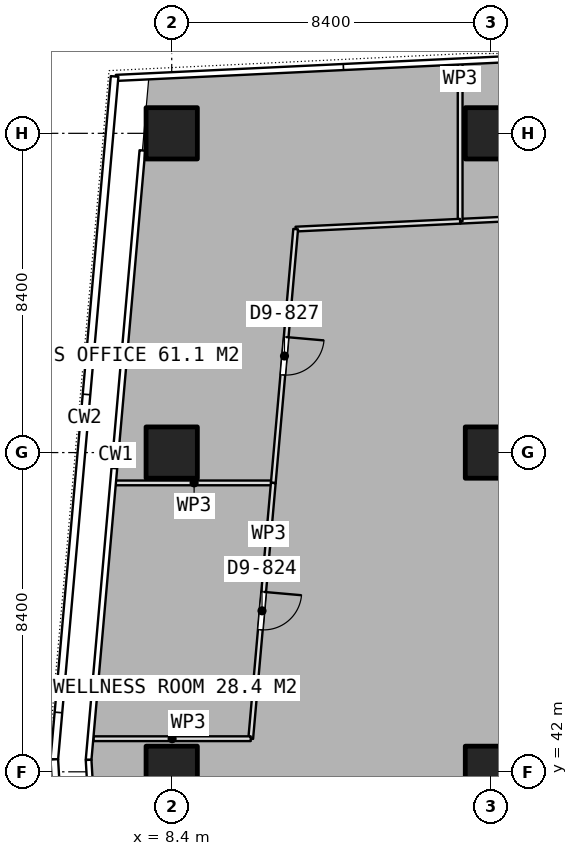
"""IFC4 building model, lengths in metres.
Left out: names, types, materials, properties, quantities, classifications, styles, units other than length and angle.
Written with IfcOpenShell. Run it as: python <this file> out.ifc"""

import sys

from ifc_helpers import new_model, si_unit, direction, frame, frame_2d, origin, origin_2d, place, context, subcontext, project, spatial, rectangle, extrude, element, fill, save


model = new_model("IFC4")
c1 = context("Model", 3, precision=1e-05, world=origin(), true_north=direction((0.0, 1.0)))
c2 = subcontext(c1, "Body", "Model", "MODEL_VIEW")
j1 = project(units=[si_unit("LENGTHUNIT", "METRE"), si_unit("PLANEANGLEUNIT", "RADIAN")], contexts=[c1])
p1 = place(None, origin())
s1 = spatial("IfcSite", under=j1, at=p1, CompositionType="ELEMENT")
p2 = place(p1, origin())
s2 = spatial("IfcBuilding", under=s1, at=p2, CompositionType="ELEMENT")
p3 = place(p2, frame((0.0, 0.0, 202.7)))
s3 = spatial("IfcBuildingStorey", under=s2, at=p3, CompositionType="ELEMENT", Elevation=202.7)
for number, where, z_axis, x_axis in (
    (1, (8.4, 42.0, 0.0), (0.0, 0.0, 1.0), (1.0, 0.0, 0.0)),
    (2, (8.4, 50.4, 0.0), (0.0, 0.0, 1.0), (1.0, 0.0, 0.0)),
    (3, (8.4, 58.8, 0.0), (0.0, 0.0, 1.0), (1.0, 0.0, 0.0)),
    (4, (16.8, 42.0, 0.0), (0.0, 0.0, 1.0), (1.0, 0.0, 0.0)),
    (5, (16.8, 50.4, 0.0), (0.0, 0.0, 1.0), (1.0, 0.0, 0.0)),
    (6, (16.8, 58.8, 0.0), (0.0, 0.0, 1.0), (1.0, 0.0, 0.0)),
):
    element("IfcColumn", number, at=place(p3, frame(where, z_axis=z_axis, x_axis=x_axis)), inside=s3, PredefinedType="COLUMN", context=c2, shape_type="SweptSolid", body=[
        extrude(rectangle(XDim=1.35, YDim=1.35, at=origin_2d()), origin(), (0.0, 0.0, 1.0), 3.75),
    ])
p4 = place(p3, frame((24.317, 56.885, 0.0), z_axis=(0.0, 0.0, 1.0), x_axis=(-0.998859973319, -0.047736293327, 0.0)))
e7 = element("IfcWall", 7, at=p4, inside=s3, PredefinedType="PARTITIONING", context=c2, shape_type="SweptSolid", body=[
    extrude(rectangle(XDim=8.336, YDim=0.125, at=frame_2d((4.168, 0.0))), origin(), (0.0, 0.0, 1.0), 3.5),
])
p5 = place(p4, frame((3.668, 0.0, 0.0)))
e8 = element("IfcOpeningElement", 8, at=p5, cuts=e7, PredefinedType="OPENING", context=c2, shape_type="SweptSolid", body=[
    extrude(rectangle(XDim=1.0, YDim=2.1, at=frame_2d((0.5, 1.05))), frame((0.0, 0.073, 0.0), z_axis=(0.0, -1.0, 0.0), x_axis=(1.0, 0.0, 0.0)), (0.0, 0.0, 1.0), 0.145),
])
p6 = place(p3, frame((15.99, 56.487, 0.0), z_axis=(0.0, 0.0, 1.0), x_axis=(0.0, 1.0, 0.0)))
e9 = element("IfcWall", 9, at=p6, inside=s3, PredefinedType="PARTITIONING", context=c2, shape_type="SweptSolid", body=[
    extrude(rectangle(XDim=4.155, YDim=0.125, at=frame_2d((2.078, 0.0))), origin(), (0.0, 0.0, 1.0), 3.5),
])
p7 = place(p3, frame((11.073, 49.602, 0.0), z_axis=(0.0, 0.0, 1.0), x_axis=(-1.0, 0.0, 0.0)))
e10 = element("IfcWall", 10, at=p7, inside=s3, PredefinedType="PARTITIONING", context=c2, shape_type="SweptSolid", body=[
    extrude(rectangle(XDim=4.167, YDim=0.125, at=frame_2d((2.083, 0.0))), origin(), (0.0, 0.0, 1.0), 3.5),
])
p8 = place(p3, frame((15.989, 56.487, 0.0), z_axis=(0.0, 0.0, 1.0), x_axis=(-0.998857273451, -0.047792753365, 0.0)))
e11 = element("IfcWall", 11, at=p8, inside=s3, PredefinedType="PARTITIONING", context=c2, shape_type="SweptSolid", body=[
    extrude(rectangle(XDim=4.332, YDim=0.125, at=frame_2d((2.166, 0.0))), origin(), (0.0, 0.0, 1.0), 3.5),
])
p9 = place(p3, frame((11.662, 56.28, 0.0), z_axis=(0.0, 0.0, 1.0), x_axis=(-0.087875742136, -0.99613144411, 0.0)))
e12 = element("IfcWall", 12, at=p9, inside=s3, PredefinedType="PARTITIONING", context=c2, shape_type="SweptSolid", body=[
    extrude(rectangle(XDim=6.704, YDim=0.125, at=frame_2d((3.352, 0.0))), origin(), (0.0, 0.0, 1.0), 3.5),
])
p10 = place(p9, frame((2.852, 0.0, 0.0)))
e13 = element("IfcOpeningElement", 13, at=p10, cuts=e12, PredefinedType="OPENING", context=c2, shape_type="SweptSolid", body=[
    extrude(rectangle(XDim=1.0, YDim=2.1, at=frame_2d((0.5, 1.05))), frame((0.0, 0.073, 0.0), z_axis=(0.0, -1.0, 0.0), x_axis=(1.0, 0.0, 0.0)), (0.0, 0.0, 1.0), 0.145),
])
p11 = place(p3, frame((11.073, 49.601, 0.0), z_axis=(0.0, 0.0, 1.0), x_axis=(-0.087919121044, -0.9961276164, 0.0)))
e14 = element("IfcWall", 14, at=p11, inside=s3, PredefinedType="PARTITIONING", context=c2, shape_type="SweptSolid", body=[
    extrude(rectangle(XDim=6.756, YDim=0.125, at=frame_2d((3.378, 0.0))), origin(), (0.0, 0.0, 1.0), 3.5),
])
p12 = place(p11, frame((2.878, 0.0, 0.0)))
e15 = element("IfcOpeningElement", 15, at=p12, cuts=e14, PredefinedType="OPENING", context=c2, shape_type="SweptSolid", body=[
    extrude(rectangle(XDim=1.0, YDim=2.1, at=frame_2d((0.5, 1.05))), frame((0.0, 0.073, 0.0), z_axis=(0.0, -1.0, 0.0), x_axis=(1.0, 0.0, 0.0)), (0.0, 0.0, 1.0), 0.145),
])
p13 = place(p3, frame((10.479, 42.871, 0.0), z_axis=(0.0, 0.0, 1.0), x_axis=(-1.0, 0.0, 0.0)))
e16 = element("IfcWall", 16, at=p13, inside=s3, PredefinedType="PARTITIONING", context=c2, shape_type="SweptSolid", body=[
    extrude(rectangle(XDim=4.137, YDim=0.125, at=frame_2d((2.068, 0.0))), origin(), (0.0, 0.0, 1.0), 3.5),
])
p14 = place(p10, origin())
e17 = element("IfcDoor", 17, at=p14, inside=s3, OperationType="SINGLE_SWING_LEFT", PredefinedType="DOOR", context=c2, shape_type="SweptSolid", body=[
    extrude(rectangle(XDim=1.0, YDim=2.1, at=frame_2d((0.5, 1.05))), frame((0.0, 0.025, 0.0), z_axis=(0.0, -1.0, 0.0), x_axis=(1.0, 0.0, 0.0)), (0.0, 0.0, 1.0), 0.05),
])
fill(e13, e17)
p15 = place(p12, origin())
e18 = element("IfcDoor", 18, at=p15, inside=s3, OperationType="SINGLE_SWING_LEFT", PredefinedType="DOOR", context=c2, shape_type="SweptSolid", body=[
    extrude(rectangle(XDim=1.0, YDim=2.1, at=frame_2d((0.5, 1.05))), frame((0.0, 0.025, 0.0), z_axis=(0.0, -1.0, 0.0), x_axis=(1.0, 0.0, 0.0)), (0.0, 0.0, 1.0), 0.05),
])
fill(e15, e18)
save(model, sys.argv[1])
